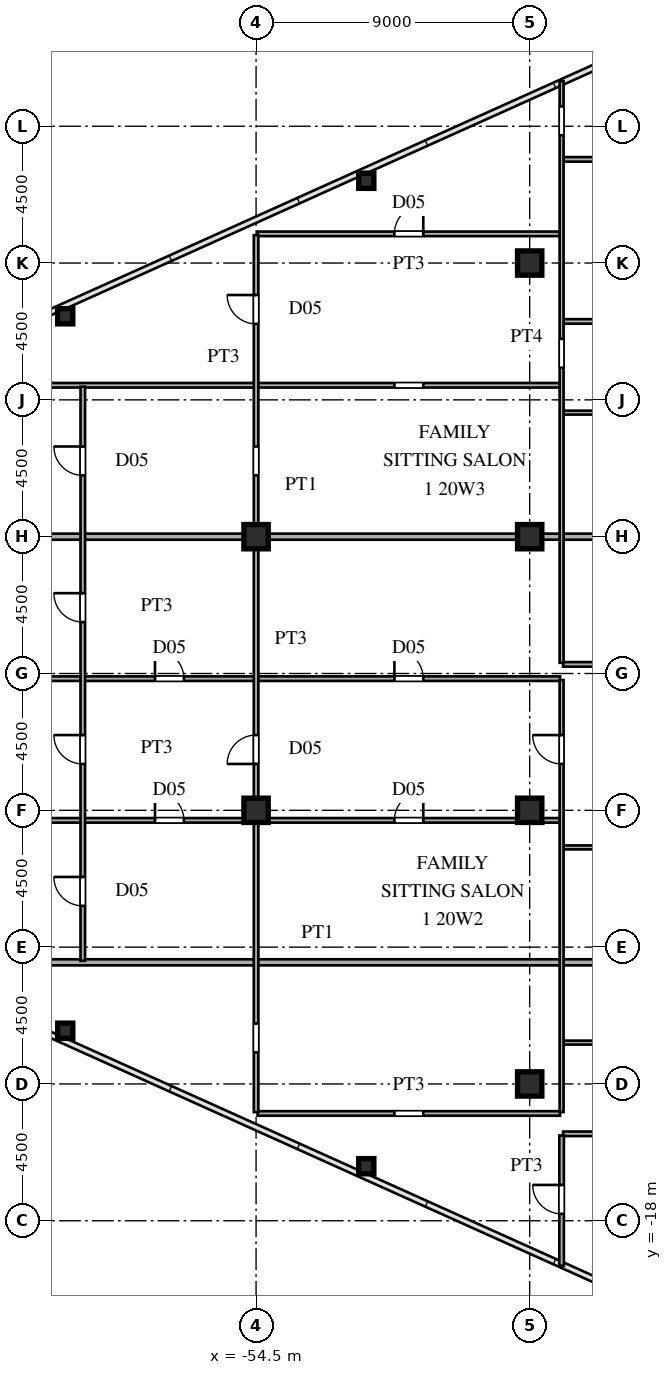
"""IFC4 building model, lengths in metres.
Left out: names, types, materials, properties, quantities, classifications, styles, units other than length and angle.
Written with IfcOpenShell. Run it as: python <this file> out.ifc"""

import sys

from ifc_helpers import new_model, si_unit, direction, frame, frame_2d, origin, origin_2d, place, context, subcontext, project, spatial, rectangle, hollow_rectangle, i_section, extrude, source, transform, mapped, element, fill, save


model = new_model("IFC4")
c1 = context("Model", 3, precision=1e-05, world=origin(), true_north=direction((0.0, 1.0)))
c2 = subcontext(c1, "Body", "Model", "MODEL_VIEW")
j1 = project(units=[si_unit("LENGTHUNIT", "METRE"), si_unit("PLANEANGLEUNIT", "RADIAN")], contexts=[c1])
p1 = place(None, origin())
s1 = spatial("IfcSite", under=j1, at=p1, CompositionType="ELEMENT")
p2 = place(p1, origin())
s2 = spatial("IfcBuilding", under=s1, at=p2, CompositionType="ELEMENT")
p3 = place(p2, frame((0.0, 0.0, 76.5)))
s3 = spatial("IfcBuildingStorey", under=s2, at=p3, CompositionType="ELEMENT", Elevation=76.5)
m1 = source(origin(), c2, "Body", "SweptSolid", [
    extrude(i_section(OverallWidth=0.8, OverallDepth=0.8, WebThickness=0.032, FlangeThickness=0.05, at=origin_2d()), origin(), (0.0, 0.0, 1.0), 3.6),
])
for number, where, z_axis, x_axis in (
    (1, (-45.5, -13.5, 0.0), (0.0, 0.0, 1.0), (1.0, 0.0, 0.0)),
    (2, (-45.5, -4.5, 0.0), (0.0, 0.0, 1.0), (1.0, 0.0, 0.0)),
    (3, (-45.5, 4.5, 0.0), (0.0, 0.0, 1.0), (1.0, 0.0, 0.0)),
    (4, (-45.5, 13.5, 0.0), (0.0, 0.0, 1.0), (1.0, 0.0, 0.0)),
    (5, (-54.5, -4.5, 0.0), (0.0, 0.0, 1.0), (1.0, 0.0, 0.0)),
    (6, (-54.5, 4.5, 0.0), (0.0, 0.0, 1.0), (1.0, 0.0, 0.0)),
):
    element("IfcColumn", number, at=place(p3, frame(where, z_axis=z_axis, x_axis=x_axis)), inside=s3, PredefinedType="COLUMN", context=c2, shape_type="MappedRepresentation", body=[
        mapped(m1, transform((0.0, 0.0, 0.0), scale=1.0)),
    ])
m2 = source(origin(), c2, "Body", "SweptSolid", [
    extrude(hollow_rectangle(XDim=0.5, YDim=0.5, WallThickness=0.02, at=origin_2d()), origin(), (0.0, 0.0, 1.0), 3.6),
])
for number, where, z_axis, x_axis in (
    (7, (-50.875, -16.205, 0.0), (0.0, 0.0, 1.0), (1.0, 0.0, 0.0)),
    (8, (-60.778, -11.749, 0.0), (0.0, 0.0, 1.0), (1.0, 0.0, 0.0)),
    (9, (-50.875, 16.205, 0.0), (0.0, 0.0, 1.0), (1.0, 0.0, 0.0)),
    (10, (-60.778, 11.749, 0.0), (0.0, 0.0, 1.0), (1.0, 0.0, 0.0)),
):
    element("IfcColumn", number, at=place(p3, frame(where, z_axis=z_axis, x_axis=x_axis)), inside=s3, PredefinedType="COLUMN", context=c2, shape_type="MappedRepresentation", body=[
        mapped(m2, transform((0.0, 0.0, 0.0), scale=1.0)),
    ])
p4 = place(p3, frame((-44.4, -15.14, 0.0), z_axis=(0.0, 0.0, 1.0), x_axis=(1.0, 0.0, 0.0)))
e11 = element("IfcWall", 11, at=p4, inside=s3, PredefinedType="PARTITIONING", context=c2, shape_type="SweptSolid", body=[
    extrude(rectangle(XDim=6.05, YDim=0.15, at=frame_2d((3.025, 0.0))), origin(), (0.0, 0.0, 1.0), 3.38),
])
p5 = place(p4, frame((2.55, 0.0, 0.0)))
e12 = element("IfcOpeningElement", 12, at=p5, cuts=e11, PredefinedType="OPENING", context=c2, shape_type="SweptSolid", body=[
    extrude(rectangle(XDim=0.95, YDim=2.15, at=frame_2d((0.475, 1.075))), frame((0.0, 0.085, 0.0), z_axis=(0.0, -1.0, 0.0), x_axis=(1.0, 0.0, 0.0)), (0.0, 0.0, 1.0), 0.17),
])
p6 = place(p3, frame((-54.45, -14.47, 0.0), z_axis=(0.0, 0.0, 1.0), x_axis=(1.0, 0.0, 0.0)))
e13 = element("IfcWall", 13, at=p6, inside=s3, PredefinedType="PARTITIONING", context=c2, shape_type="SweptSolid", body=[
    extrude(rectangle(XDim=9.95, YDim=0.15, at=frame_2d((4.975, 0.0))), origin(), (0.0, 0.0, 1.0), 3.38),
])
p7 = place(p6, frame((4.5, 0.0, 0.0)))
e14 = element("IfcOpeningElement", 14, at=p7, cuts=e13, PredefinedType="OPENING", context=c2, shape_type="SweptSolid", body=[
    extrude(rectangle(XDim=0.95, YDim=2.15, at=frame_2d((0.475, 1.075))), frame((0.0, 0.085, 0.0), z_axis=(0.0, -1.0, 0.0), x_axis=(1.0, 0.0, 0.0)), (0.0, 0.0, 1.0), 0.17),
])
p8 = place(p3, frame((-44.4, -12.14, 0.0), z_axis=(0.0, 0.0, 1.0), x_axis=(1.0, 0.0, 0.0)))
e15 = element("IfcWall", 15, at=p8, inside=s3, PredefinedType="PARTITIONING", context=c2, shape_type="SweptSolid", body=[
    extrude(rectangle(XDim=6.05, YDim=0.13, at=frame_2d((3.025, 0.0))), origin(), (0.0, 0.0, 1.0), 3.38),
])
p9 = place(p8, frame((2.585, 0.0, 0.0)))
e16 = element("IfcOpeningElement", 16, at=p9, cuts=e15, PredefinedType="OPENING", context=c2, shape_type="SweptSolid", body=[
    extrude(rectangle(XDim=0.88, YDim=2.1, at=frame_2d((0.44, 1.05))), frame((0.0, 0.075, 0.0), z_axis=(0.0, -1.0, 0.0), x_axis=(1.0, 0.0, 0.0)), (0.0, 0.0, 1.0), 0.15),
])
p10 = place(p3, frame((-66.568, -9.5, 0.0), z_axis=(0.0, 0.0, 1.0), x_axis=(1.0, 0.0, 0.0)))
e17 = element("IfcWall", 17, at=p10, inside=s3, PredefinedType="PARTITIONING", context=c2, shape_type="SweptSolid", body=[
    extrude(rectangle(XDim=28.188, YDim=0.2, at=frame_2d((14.094, 0.0))), origin(), (0.0, 0.0, 1.0), 3.38),
])
p11 = place(p3, frame((-44.4, -5.72, 0.0), z_axis=(0.0, 0.0, 1.0), x_axis=(1.0, 0.0, 0.0)))
e18 = element("IfcWall", 18, at=p11, inside=s3, PredefinedType="PARTITIONING", context=c2, shape_type="SweptSolid", body=[
    extrude(rectangle(XDim=6.05, YDim=0.13, at=frame_2d((3.025, 0.0))), origin(), (0.0, 0.0, 1.0), 3.38),
])
p12 = place(p11, frame((2.585, 0.0, 0.0)))
e19 = element("IfcOpeningElement", 19, at=p12, cuts=e18, PredefinedType="OPENING", context=c2, shape_type="SweptSolid", body=[
    extrude(rectangle(XDim=0.88, YDim=2.1, at=frame_2d((0.44, 1.05))), frame((0.0, 0.075, 0.0), z_axis=(0.0, -1.0, 0.0), x_axis=(1.0, 0.0, 0.0)), (0.0, 0.0, 1.0), 0.15),
])
p13 = place(p3, frame((-71.035, -4.83, 0.0), z_axis=(0.0, 0.0, 1.0), x_axis=(1.0, 0.0, 0.0)))
e20 = element("IfcWall", 20, at=p13, inside=s3, PredefinedType="PARTITIONING", context=c2, shape_type="SweptSolid", body=[
    extrude(rectangle(XDim=26.535, YDim=0.15, at=frame_2d((13.268, 0.0))), origin(), (0.0, 0.0, 1.0), 3.38),
])
p14 = place(p13, frame((21.085, 0.0, 0.0)))
e21 = element("IfcOpeningElement", 21, at=p14, cuts=e20, PredefinedType="OPENING", context=c2, shape_type="SweptSolid", body=[
    extrude(rectangle(XDim=0.95, YDim=2.15, at=frame_2d((0.475, 1.075))), frame((0.0, 0.085, 0.0), z_axis=(0.0, -1.0, 0.0), x_axis=(1.0, 0.0, 0.0)), (0.0, 0.0, 1.0), 0.17),
])
p15 = place(p13, frame((13.21, 0.0, 0.0)))
e22 = element("IfcOpeningElement", 22, at=p15, cuts=e20, PredefinedType="OPENING", context=c2, shape_type="SweptSolid", body=[
    extrude(rectangle(XDim=0.95, YDim=2.15, at=frame_2d((0.475, 1.075))), frame((0.0, 0.085, 0.0), z_axis=(0.0, -1.0, 0.0), x_axis=(1.0, 0.0, 0.0)), (0.0, 0.0, 1.0), 0.17),
])
p16 = place(p3, frame((-71.035, -0.17, 0.0), z_axis=(0.0, 0.0, 1.0), x_axis=(1.0, 0.0, 0.0)))
e23 = element("IfcWall", 23, at=p16, inside=s3, PredefinedType="PARTITIONING", context=c2, shape_type="SweptSolid", body=[
    extrude(rectangle(XDim=26.535, YDim=0.15, at=frame_2d((13.268, 0.0))), origin(), (0.0, 0.0, 1.0), 3.38),
])
p17 = place(p16, frame((21.085, 0.0, 0.0)))
e24 = element("IfcOpeningElement", 24, at=p17, cuts=e23, PredefinedType="OPENING", context=c2, shape_type="SweptSolid", body=[
    extrude(rectangle(XDim=0.95, YDim=2.15, at=frame_2d((0.475, 1.075))), frame((0.0, 0.085, 0.0), z_axis=(0.0, -1.0, 0.0), x_axis=(1.0, 0.0, 0.0)), (0.0, 0.0, 1.0), 0.17),
])
p18 = place(p16, frame((13.21, 0.0, 0.0)))
e25 = element("IfcOpeningElement", 25, at=p18, cuts=e23, PredefinedType="OPENING", context=c2, shape_type="SweptSolid", body=[
    extrude(rectangle(XDim=0.95, YDim=2.15, at=frame_2d((0.475, 1.075))), frame((0.0, 0.085, 0.0), z_axis=(0.0, -1.0, 0.0), x_axis=(1.0, 0.0, 0.0)), (0.0, 0.0, 1.0), 0.17),
])
p19 = place(p3, frame((-44.4, 0.3, 0.0), z_axis=(0.0, 0.0, 1.0), x_axis=(1.0, 0.0, 0.0)))
e26 = element("IfcWall", 26, at=p19, inside=s3, PredefinedType="PARTITIONING", context=c2, shape_type="SweptSolid", body=[
    extrude(rectangle(XDim=6.05, YDim=0.15, at=frame_2d((3.025, 0.0))), origin(), (0.0, 0.0, 1.0), 3.38),
])
p20 = place(p19, frame((2.55, 0.0, 0.0)))
e27 = element("IfcOpeningElement", 27, at=p20, cuts=e26, PredefinedType="OPENING", context=c2, shape_type="SweptSolid", body=[
    extrude(rectangle(XDim=0.95, YDim=2.15, at=frame_2d((0.475, 1.075))), frame((0.0, 0.085, 0.0), z_axis=(0.0, -1.0, 0.0), x_axis=(1.0, 0.0, 0.0)), (0.0, 0.0, 1.0), 0.17),
])
p21 = place(p3, frame((-71.005, 4.5, 0.0), z_axis=(0.0, 0.0, 1.0), x_axis=(1.0, 0.0, 0.0)))
e28 = element("IfcWall", 28, at=p21, inside=s3, PredefinedType="PARTITIONING", context=c2, shape_type="SweptSolid", body=[
    extrude(rectangle(XDim=16.485, YDim=0.2, at=frame_2d((8.242, 0.0))), origin(), (0.0, 0.0, 1.0), 3.38),
])
p22 = place(p3, frame((-54.52, 4.5, 0.0), z_axis=(0.0, 0.0, 1.0), x_axis=(1.0, 0.0, 0.0)))
e29 = element("IfcWall", 29, at=p22, inside=s3, PredefinedType="PARTITIONING", context=c2, shape_type="SweptSolid", body=[
    extrude(rectangle(XDim=16.14, YDim=0.2, at=frame_2d((8.07, 0.0))), origin(), (0.0, 0.0, 1.0), 2.68),
])
p23 = place(p3, frame((-44.4, 8.58, 0.0), z_axis=(0.0, 0.0, 1.0), x_axis=(1.0, 0.0, 0.0)))
e30 = element("IfcWall", 30, at=p23, inside=s3, PredefinedType="PARTITIONING", context=c2, shape_type="SweptSolid", body=[
    extrude(rectangle(XDim=6.05, YDim=0.13, at=frame_2d((3.025, 0.0))), origin(), (0.0, 0.0, 1.0), 3.38),
])
p24 = place(p23, frame((2.585, 0.0, 0.0)))
e31 = element("IfcOpeningElement", 31, at=p24, cuts=e30, PredefinedType="OPENING", context=c2, shape_type="SweptSolid", body=[
    extrude(rectangle(XDim=0.88, YDim=2.1, at=frame_2d((0.44, 1.05))), frame((0.0, 0.075, 0.0), z_axis=(0.0, -1.0, 0.0), x_axis=(1.0, 0.0, 0.0)), (0.0, 0.0, 1.0), 0.15),
])
p25 = place(p3, frame((-66.629, 9.48, 0.0), z_axis=(0.0, 0.0, 1.0), x_axis=(1.0, 0.0, 0.0)))
e32 = element("IfcWall", 32, at=p25, inside=s3, PredefinedType="PARTITIONING", context=c2, shape_type="SweptSolid", body=[
    extrude(rectangle(XDim=22.129, YDim=0.15, at=frame_2d((11.064, 0.0))), origin(), (0.0, 0.0, 1.0), 3.38),
])
p26 = place(p25, frame((16.679, 0.0, 0.0)))
e33 = element("IfcOpeningElement", 33, at=p26, cuts=e32, PredefinedType="OPENING", context=c2, shape_type="SweptSolid", body=[
    extrude(rectangle(XDim=0.95, YDim=2.15, at=frame_2d((0.475, 1.075))), frame((0.0, 0.085, 0.0), z_axis=(0.0, -1.0, 0.0), x_axis=(1.0, 0.0, 0.0)), (0.0, 0.0, 1.0), 0.17),
])
p27 = place(p3, frame((-44.4, 11.58, 0.0), z_axis=(0.0, 0.0, 1.0), x_axis=(1.0, 0.0, 0.0)))
e34 = element("IfcWall", 34, at=p27, inside=s3, PredefinedType="PARTITIONING", context=c2, shape_type="SweptSolid", body=[
    extrude(rectangle(XDim=6.05, YDim=0.15, at=frame_2d((3.025, 0.0))), origin(), (0.0, 0.0, 1.0), 3.38),
])
p28 = place(p27, frame((2.55, 0.0, 0.0)))
e35 = element("IfcOpeningElement", 35, at=p28, cuts=e34, PredefinedType="OPENING", context=c2, shape_type="SweptSolid", body=[
    extrude(rectangle(XDim=0.95, YDim=2.15, at=frame_2d((0.475, 1.075))), frame((0.0, 0.085, 0.0), z_axis=(0.0, -1.0, 0.0), x_axis=(1.0, 0.0, 0.0)), (0.0, 0.0, 1.0), 0.17),
])
p29 = place(p3, frame((-54.45, 14.46, 0.0), z_axis=(0.0, 0.0, 1.0), x_axis=(1.0, 0.0, 0.0)))
e36 = element("IfcWall", 36, at=p29, inside=s3, PredefinedType="PARTITIONING", context=c2, shape_type="SweptSolid", body=[
    extrude(rectangle(XDim=9.95, YDim=0.15, at=frame_2d((4.975, 0.0))), origin(), (0.0, 0.0, 1.0), 3.38),
])
p30 = place(p29, frame((4.5, 0.0, 0.0)))
e37 = element("IfcOpeningElement", 37, at=p30, cuts=e36, PredefinedType="OPENING", context=c2, shape_type="SweptSolid", body=[
    extrude(rectangle(XDim=0.95, YDim=2.15, at=frame_2d((0.475, 1.075))), frame((0.0, 0.085, 0.0), z_axis=(0.0, -1.0, 0.0), x_axis=(1.0, 0.0, 0.0)), (0.0, 0.0, 1.0), 0.17),
])
p31 = place(p3, frame((-44.4, 16.91, 0.0), z_axis=(0.0, 0.0, 1.0), x_axis=(1.0, 0.0, 0.0)))
e38 = element("IfcWall", 38, at=p31, inside=s3, PredefinedType="PARTITIONING", context=c2, shape_type="SweptSolid", body=[
    extrude(rectangle(XDim=6.1, YDim=0.15, at=frame_2d((3.05, 0.0))), origin(), (0.0, 0.0, 1.0), 3.38),
])
p32 = place(p3, frame((-60.2, -9.45, 0.0), z_axis=(0.0, 0.0, 1.0), x_axis=(0.0, 1.0, 0.0)))
e39 = element("IfcWall", 39, at=p32, inside=s3, PredefinedType="PARTITIONING", context=c2, shape_type="SweptSolid", body=[
    extrude(rectangle(XDim=18.883, YDim=0.15, at=frame_2d((9.441, 0.0))), origin(), (0.0, 0.0, 1.0), 3.38),
])
p33 = place(p32, frame((1.808, 0.0, 0.0)))
e40 = element("IfcOpeningElement", 40, at=p33, cuts=e39, PredefinedType="OPENING", context=c2, shape_type="SweptSolid", body=[
    extrude(rectangle(XDim=0.95, YDim=2.15, at=frame_2d((0.475, 1.075))), frame((0.0, 0.085, 0.0), z_axis=(0.0, -1.0, 0.0), x_axis=(1.0, 0.0, 0.0)), (0.0, 0.0, 1.0), 0.17),
])
p34 = place(p32, frame((6.475, 0.0, 0.0)))
e41 = element("IfcOpeningElement", 41, at=p34, cuts=e39, PredefinedType="OPENING", context=c2, shape_type="SweptSolid", body=[
    extrude(rectangle(XDim=0.95, YDim=2.15, at=frame_2d((0.475, 1.075))), frame((0.0, 0.085, 0.0), z_axis=(0.0, -1.0, 0.0), x_axis=(1.0, 0.0, 0.0)), (0.0, 0.0, 1.0), 0.17),
])
p35 = place(p32, frame((11.142, 0.0, 0.0)))
e42 = element("IfcOpeningElement", 42, at=p35, cuts=e39, PredefinedType="OPENING", context=c2, shape_type="SweptSolid", body=[
    extrude(rectangle(XDim=0.95, YDim=2.15, at=frame_2d((0.475, 1.075))), frame((0.0, 0.085, 0.0), z_axis=(0.0, -1.0, 0.0), x_axis=(1.0, 0.0, 0.0)), (0.0, 0.0, 1.0), 0.17),
])
p36 = place(p32, frame((15.966, 0.0, 0.0)))
e43 = element("IfcOpeningElement", 43, at=p36, cuts=e39, PredefinedType="OPENING", context=c2, shape_type="SweptSolid", body=[
    extrude(rectangle(XDim=0.95, YDim=2.15, at=frame_2d((0.475, 1.075))), frame((0.0, 0.085, 0.0), z_axis=(0.0, -1.0, 0.0), x_axis=(1.0, 0.0, 0.0)), (0.0, 0.0, 1.0), 0.17),
])
p37 = place(p3, frame((-54.5, -14.424, 0.0), z_axis=(0.0, 0.0, 1.0), x_axis=(0.0, 1.0, 0.0)))
e44 = element("IfcWall", 44, at=p37, inside=s3, PredefinedType="PARTITIONING", context=c2, shape_type="SweptSolid", body=[
    extrude(rectangle(XDim=28.839, YDim=0.15, at=frame_2d((14.419, 0.0))), origin(), (0.0, 0.0, 1.0), 2.68),
])
p38 = place(p37, frame((1.962, 0.0, 0.0)))
e45 = element("IfcOpeningElement", 45, at=p38, cuts=e44, PredefinedType="OPENING", context=c2, shape_type="SweptSolid", body=[
    extrude(rectangle(XDim=0.95, YDim=2.15, at=frame_2d((0.475, 1.075))), frame((0.0, 0.085, 0.0), z_axis=(0.0, -1.0, 0.0), x_axis=(1.0, 0.0, 0.0)), (0.0, 0.0, 1.0), 0.17),
])
p39 = place(p37, frame((11.449, 0.0, 0.0)))
e46 = element("IfcOpeningElement", 46, at=p39, cuts=e44, PredefinedType="OPENING", context=c2, shape_type="SweptSolid", body=[
    extrude(rectangle(XDim=0.95, YDim=2.15, at=frame_2d((0.475, 1.075))), frame((0.0, 0.085, 0.0), z_axis=(0.0, -1.0, 0.0), x_axis=(1.0, 0.0, 0.0)), (0.0, 0.0, 1.0), 0.17),
])
p40 = place(p37, frame((25.923, 0.0, 0.0)))
e47 = element("IfcOpeningElement", 47, at=p40, cuts=e44, PredefinedType="OPENING", context=c2, shape_type="SweptSolid", body=[
    extrude(rectangle(XDim=0.95, YDim=2.15, at=frame_2d((0.475, 1.075))), frame((0.0, 0.085, 0.0), z_axis=(0.0, -1.0, 0.0), x_axis=(1.0, 0.0, 0.0)), (0.0, 0.0, 1.0), 0.17),
])
p41 = place(p37, frame((20.94, 0.0, 0.0)))
e48 = element("IfcOpeningElement", 48, at=p41, cuts=e44, PredefinedType="OPENING", context=c2, shape_type="SweptSolid", body=[
    extrude(rectangle(XDim=0.95, YDim=2.15, at=frame_2d((0.475, 1.075))), frame((0.0, 0.085, 0.0), z_axis=(0.0, -1.0, 0.0), x_axis=(1.0, 0.0, 0.0)), (0.0, 0.0, 1.0), 0.17),
])
p42 = place(p3, frame((-44.45, -19.483, 0.0), z_axis=(0.0, 0.0, 1.0), x_axis=(0.0, 1.0, 0.0)))
e49 = element("IfcWall", 49, at=p42, inside=s3, PredefinedType="PARTITIONING", context=c2, shape_type="SweptSolid", body=[
    extrude(rectangle(XDim=4.288, YDim=0.15, at=frame_2d((2.144, 0.0))), origin(), (0.0, 0.0, 1.0), 3.38),
])
p43 = place(p42, frame((1.712, 0.0, 0.0)))
e50 = element("IfcOpeningElement", 50, at=p43, cuts=e49, PredefinedType="OPENING", context=c2, shape_type="SweptSolid", body=[
    extrude(rectangle(XDim=0.95, YDim=2.15, at=frame_2d((0.475, 1.075))), frame((0.0, 0.085, 0.0), z_axis=(0.0, -1.0, 0.0), x_axis=(1.0, 0.0, 0.0)), (0.0, 0.0, 1.0), 0.17),
])
p44 = place(p3, frame((-44.45, -14.424, 0.0), z_axis=(0.0, 0.0, 1.0), x_axis=(0.0, 1.0, 0.0)))
e51 = element("IfcWall", 51, at=p44, inside=s3, PredefinedType="PARTITIONING", context=c2, shape_type="SweptSolid", body=[
    extrude(rectangle(XDim=14.207, YDim=0.13, at=frame_2d((7.104, 0.0))), origin(), (0.0, 0.0, 1.0), 3.38),
])
p45 = place(p44, frame((11.449, 0.0, 0.0)))
e52 = element("IfcOpeningElement", 52, at=p45, cuts=e51, PredefinedType="OPENING", context=c2, shape_type="SweptSolid", body=[
    extrude(rectangle(XDim=0.95, YDim=2.15, at=frame_2d((0.475, 1.075))), frame((0.0, 0.075, 0.0), z_axis=(0.0, -1.0, 0.0), x_axis=(1.0, 0.0, 0.0)), (0.0, 0.0, 1.0), 0.15),
])
p46 = place(p3, frame((-44.45, 0.352, 0.0), z_axis=(0.0, 0.0, 1.0), x_axis=(0.0, 1.0, 0.0)))
e53 = element("IfcWall", 53, at=p46, inside=s3, PredefinedType="PARTITIONING", context=c2, shape_type="SweptSolid", body=[
    extrude(rectangle(XDim=19.131, YDim=0.13, at=frame_2d((9.565, 0.0))), origin(), (0.0, 0.0, 1.0), 3.38),
])
p47 = place(p46, frame((9.703, 0.0, 0.0)))
e54 = element("IfcOpeningElement", 54, at=p47, cuts=e53, PredefinedType="OPENING", context=c2, shape_type="SweptSolid", body=[
    extrude(rectangle(XDim=0.95, YDim=2.15, at=frame_2d((0.475, 1.075))), frame((0.0, 0.075, 0.0), z_axis=(0.0, -1.0, 0.0), x_axis=(1.0, 0.0, 0.0)), (0.0, 0.0, 1.0), 0.15),
])
p48 = place(p46, frame((17.351, 0.0, 0.0)))
e55 = element("IfcOpeningElement", 55, at=p48, cuts=e53, PredefinedType="OPENING", context=c2, shape_type="SweptSolid", body=[
    extrude(rectangle(XDim=0.95, YDim=2.15, at=frame_2d((0.475, 1.075))), frame((0.0, 0.075, 0.0), z_axis=(0.0, -1.0, 0.0), x_axis=(1.0, 0.0, 0.0)), (0.0, 0.0, 1.0), 0.15),
])
m3 = source(origin(), c2, "Body", "SweptSolid", [
    extrude(rectangle(XDim=0.95, YDim=2.15, at=frame_2d((0.475, 1.075))), frame((0.0, 0.025, 0.0), z_axis=(0.0, -1.0, 0.0), x_axis=(1.0, 0.0, 0.0)), (0.0, 0.0, 1.0), 0.05),
])
p49 = place(p14, origin())
e56 = element("IfcDoor", 56, at=p49, inside=s3, OperationType="SINGLE_SWING_RIGHT", PredefinedType="DOOR", context=c2, shape_type="MappedRepresentation", body=[
    mapped(m3, transform((0.0, 0.0, 0.0), scale=1.0)),
])
fill(e21, e56)
p50 = place(p15, origin())
e57 = element("IfcDoor", 57, at=p50, inside=s3, OperationType="SINGLE_SWING_LEFT", PredefinedType="DOOR", context=c2, shape_type="MappedRepresentation", body=[
    mapped(m3, transform((0.0, 0.0, 0.0), scale=1.0)),
])
fill(e22, e57)
p51 = place(p17, origin())
e58 = element("IfcDoor", 58, at=p51, inside=s3, OperationType="SINGLE_SWING_LEFT", PredefinedType="DOOR", context=c2, shape_type="MappedRepresentation", body=[
    mapped(m3, transform((0.0, 0.0, 0.0), scale=1.0)),
])
fill(e24, e58)
p52 = place(p18, origin())
e59 = element("IfcDoor", 59, at=p52, inside=s3, OperationType="SINGLE_SWING_LEFT", PredefinedType="DOOR", context=c2, shape_type="MappedRepresentation", body=[
    mapped(m3, transform((0.0, 0.0, 0.0), scale=1.0)),
])
fill(e25, e59)
p53 = place(p30, origin())
e60 = element("IfcDoor", 60, at=p53, inside=s3, OperationType="SINGLE_SWING_RIGHT", PredefinedType="DOOR", context=c2, shape_type="MappedRepresentation", body=[
    mapped(m3, transform((0.0, 0.0, 0.0), scale=1.0)),
])
fill(e37, e60)
p54 = place(p33, origin())
e61 = element("IfcDoor", 61, at=p54, inside=s3, OperationType="SINGLE_SWING_RIGHT", PredefinedType="DOOR", context=c2, shape_type="MappedRepresentation", body=[
    mapped(m3, transform((0.0, 0.0, 0.0), scale=1.0)),
])
fill(e40, e61)
p55 = place(p34, origin())
e62 = element("IfcDoor", 62, at=p55, inside=s3, OperationType="SINGLE_SWING_RIGHT", PredefinedType="DOOR", context=c2, shape_type="MappedRepresentation", body=[
    mapped(m3, transform((0.0, 0.0, 0.0), scale=1.0)),
])
fill(e41, e62)
p56 = place(p35, origin())
e63 = element("IfcDoor", 63, at=p56, inside=s3, OperationType="SINGLE_SWING_RIGHT", PredefinedType="DOOR", context=c2, shape_type="MappedRepresentation", body=[
    mapped(m3, transform((0.0, 0.0, 0.0), scale=1.0)),
])
fill(e42, e63)
p57 = place(p36, origin())
e64 = element("IfcDoor", 64, at=p57, inside=s3, OperationType="SINGLE_SWING_RIGHT", PredefinedType="DOOR", context=c2, shape_type="MappedRepresentation", body=[
    mapped(m3, transform((0.0, 0.0, 0.0), scale=1.0)),
])
fill(e43, e64)
p58 = place(p39, origin())
e65 = element("IfcDoor", 65, at=p58, inside=s3, OperationType="SINGLE_SWING_LEFT", PredefinedType="DOOR", context=c2, shape_type="MappedRepresentation", body=[
    mapped(m3, transform((0.0, 0.0, 0.0), scale=1.0)),
])
fill(e46, e65)
p59 = place(p40, origin())
e66 = element("IfcDoor", 66, at=p59, inside=s3, OperationType="SINGLE_SWING_RIGHT", PredefinedType="DOOR", context=c2, shape_type="MappedRepresentation", body=[
    mapped(m3, transform((0.0, 0.0, 0.0), scale=1.0)),
])
fill(e47, e66)
p60 = place(p43, origin())
e67 = element("IfcDoor", 67, at=p60, inside=s3, OperationType="SINGLE_SWING_RIGHT", PredefinedType="DOOR", context=c2, shape_type="MappedRepresentation", body=[
    mapped(m3, transform((0.0, 0.0, 0.0), scale=1.0)),
])
fill(e50, e67)
p61 = place(p45, origin())
e68 = element("IfcDoor", 68, at=p61, inside=s3, OperationType="SINGLE_SWING_RIGHT", PredefinedType="DOOR", context=c2, shape_type="MappedRepresentation", body=[
    mapped(m3, transform((0.0, 0.0, 0.0), scale=1.0)),
])
fill(e52, e68)
save(model, sys.argv[1])
